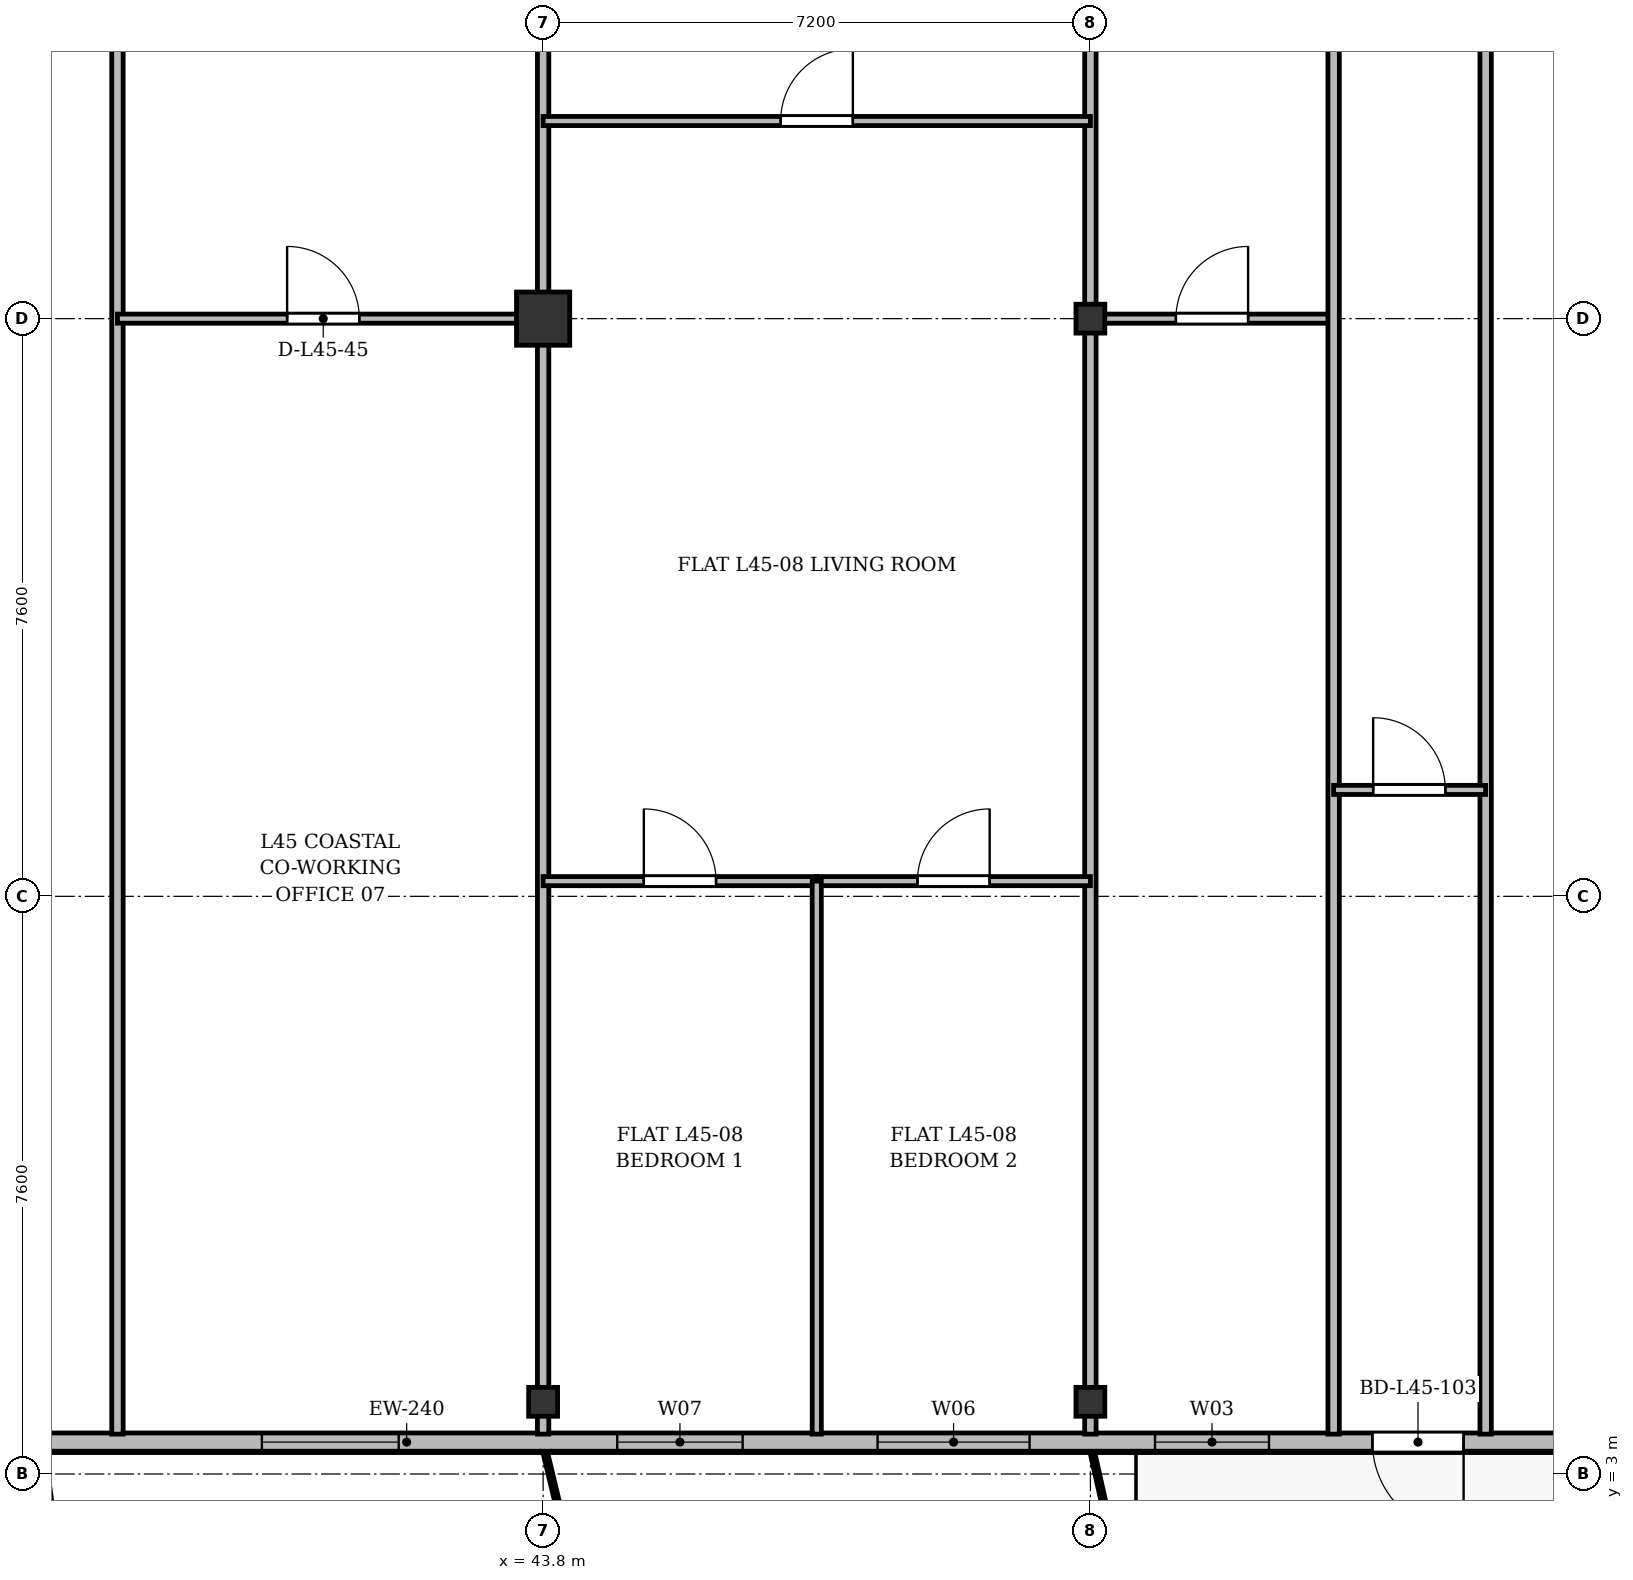
"""IFC4 building model, lengths in metres.
Left out: names, types, materials, properties, quantities, classifications, styles, units other than length and angle.
Written with IfcOpenShell. Run it as: python <this file> out.ifc"""

import sys

from ifc_helpers import new_model, si_unit, direction, frame, frame_2d, origin, origin_2d, place, context, subcontext, project, spatial, rectangle, i_section, extrude, source, transform, mapped, element, fill, save


model = new_model("IFC4")
c1 = context("Model", 3, precision=1e-05, world=origin(), true_north=direction((0.0, 1.0)))
c2 = subcontext(c1, "Body", "Model", "MODEL_VIEW")
j1 = project(units=[si_unit("LENGTHUNIT", "METRE"), si_unit("PLANEANGLEUNIT", "RADIAN")], contexts=[c1])
p1 = place(None, origin())
s1 = spatial("IfcSite", under=j1, at=p1, CompositionType="ELEMENT")
p2 = place(p1, origin())
s2 = spatial("IfcBuilding", under=s1, at=p2, CompositionType="ELEMENT")
p3 = place(p2, frame((0.0, 0.0, 171.7)))
s3 = spatial("IfcBuildingStorey", under=s2, at=p3, CompositionType="ELEMENT", Elevation=171.7)
m1 = source(origin(), c2, "Body", "SweptSolid", [
    extrude(i_section(OverallWidth=0.38, OverallDepth=0.38, WebThickness=0.02, FlangeThickness=0.03, at=origin_2d()), origin(), (0.0, 0.0, 1.0), 3.6),
])
p4 = place(p3, frame((43.8, 3.95, 0.0), z_axis=(0.0, 0.0, 1.0), x_axis=(1.0, 0.0, 0.0)))
e1 = element("IfcColumn", 1, at=p4, inside=s3, PredefinedType="COLUMN", context=c2, shape_type="MappedRepresentation", body=[
    mapped(m1, transform((0.0, 0.0, 0.0), x_axis=(1.0, 0.0, 0.0), y_axis=(0.0, 1.0, 0.0), z_axis=(0.0, 0.0, 1.0), scale=1.0)),
])
m2 = source(origin(), c2, "Body", "SweptSolid", [
    extrude(rectangle(XDim=0.7, YDim=0.7, at=origin_2d()), origin(), (0.0, 0.0, 1.0), 3.6),
])
p5 = place(p3, frame((43.8, 18.2, 0.0), z_axis=(0.0, 0.0, 1.0), x_axis=(1.0, 0.0, 0.0)))
e2 = element("IfcColumn", 2, at=p5, inside=s3, PredefinedType="COLUMN", context=c2, shape_type="MappedRepresentation", body=[
    mapped(m2, transform((0.0, 0.0, 0.0), x_axis=(1.0, 0.0, 0.0), y_axis=(0.0, 1.0, 0.0), z_axis=(0.0, 0.0, 1.0), scale=1.0)),
])
for number, where, z_axis, x_axis in (
    (3, (51.0, 3.95, 0.0), (0.0, 0.0, 1.0), (1.0, 0.0, 0.0)),
    (4, (51.0, 18.2, 0.0), (0.0, 0.0, 1.0), (1.0, 0.0, 0.0)),
):
    element("IfcColumn", number, at=place(p3, frame(where, z_axis=z_axis, x_axis=x_axis)), inside=s3, PredefinedType="COLUMN", context=c2, shape_type="MappedRepresentation", body=[
        mapped(m1, transform((0.0, 0.0, 0.0), x_axis=(1.0, 0.0, 0.0), y_axis=(0.0, 1.0, 0.0), z_axis=(0.0, 0.0, 1.0), scale=1.0)),
    ])
p6 = place(p3, frame((63.6, 3.42, 0.0), z_axis=(0.0, 0.0, 1.0), x_axis=(-1.0, 0.0, 0.0)))
e5 = element("IfcWall", 5, at=p6, inside=s3, PredefinedType="SOLIDWALL", context=c2, shape_type="SweptSolid", body=[
    extrude(rectangle(XDim=34.0, YDim=0.24, at=frame_2d((17.0, 0.0))), origin(), (0.0, 0.0, 1.0), 3.35),
])
p7 = place(p6, frame((2.845, 0.0, 0.9)))
e6 = element("IfcOpeningElement", 6, at=p7, cuts=e5, PredefinedType="OPENING", context=c2, shape_type="SweptSolid", body=[
    extrude(rectangle(XDim=1.8, YDim=1.8, at=frame_2d((0.9, 0.9))), frame((0.0, 0.13, 0.0), z_axis=(0.0, -1.0, 0.0), x_axis=(1.0, 0.0, 0.0)), (0.0, 0.0, 1.0), 0.26),
])
p8 = place(p6, frame((7.69, 0.0, 0.0)))
e7 = element("IfcOpeningElement", 7, at=p8, cuts=e5, PredefinedType="OPENING", context=c2, shape_type="SweptSolid", body=[
    extrude(rectangle(XDim=1.2, YDim=2.2, at=frame_2d((0.6, 1.1))), frame((0.0, 0.13, 0.0), z_axis=(0.0, -1.0, 0.0), x_axis=(1.0, 0.0, 0.0)), (0.0, 0.0, 1.0), 0.26),
])
p9 = place(p6, frame((10.25, 0.0, 0.9)))
e8 = element("IfcOpeningElement", 8, at=p9, cuts=e5, PredefinedType="OPENING", context=c2, shape_type="SweptSolid", body=[
    extrude(rectangle(XDim=1.5, YDim=1.75, at=frame_2d((0.75, 0.875))), frame((0.0, 0.13, 0.0), z_axis=(0.0, -1.0, 0.0), x_axis=(1.0, 0.0, 0.0)), (0.0, 0.0, 1.0), 0.26),
])
p10 = place(p6, frame((13.4, 0.0, 0.9)))
e9 = element("IfcOpeningElement", 9, at=p10, cuts=e5, PredefinedType="OPENING", context=c2, shape_type="SweptSolid", body=[
    extrude(rectangle(XDim=2.0, YDim=1.95, at=frame_2d((1.0, 0.975))), frame((0.0, 0.13, 0.0), z_axis=(0.0, -1.0, 0.0), x_axis=(1.0, 0.0, 0.0)), (0.0, 0.0, 1.0), 0.26),
])
p11 = place(p6, frame((17.175, 0.0, 0.9)))
e10 = element("IfcOpeningElement", 10, at=p11, cuts=e5, PredefinedType="OPENING", context=c2, shape_type="SweptSolid", body=[
    extrude(rectangle(XDim=1.65, YDim=1.85, at=frame_2d((0.825, 0.925))), frame((0.0, 0.13, 0.0), z_axis=(0.0, -1.0, 0.0), x_axis=(1.0, 0.0, 0.0)), (0.0, 0.0, 1.0), 0.26),
])
p12 = place(p6, frame((21.7, 0.0, 0.9)))
e11 = element("IfcOpeningElement", 11, at=p12, cuts=e5, PredefinedType="OPENING", context=c2, shape_type="SweptSolid", body=[
    extrude(rectangle(XDim=1.8, YDim=1.8, at=frame_2d((0.9, 0.9))), frame((0.0, 0.13, 0.0), z_axis=(0.0, -1.0, 0.0), x_axis=(1.0, 0.0, 0.0)), (0.0, 0.0, 1.0), 0.26),
])
p13 = place(p6, frame((28.1, 0.0, 0.9)))
e12 = element("IfcOpeningElement", 12, at=p13, cuts=e5, PredefinedType="OPENING", context=c2, shape_type="SweptSolid", body=[
    extrude(rectangle(XDim=2.2, YDim=1.8, at=frame_2d((1.1, 0.9))), frame((0.0, 0.13, 0.0), z_axis=(0.0, -1.0, 0.0), x_axis=(1.0, 0.0, 0.0)), (0.0, 0.0, 1.0), 0.26),
])
p14 = place(p3, frame((38.2, 3.525, 0.0), z_axis=(0.0, 0.0, 1.0), x_axis=(0.0, 1.0, 0.0)))
e13 = element("IfcWall", 13, at=p14, inside=s3, PredefinedType="PARTITIONING", context=c2, shape_type="SweptSolid", body=[
    extrude(rectangle(XDim=27.275, YDim=0.15, at=frame_2d((13.638, 0.0))), origin(), (0.0, 0.0, 1.0), 2.75),
])
for number, where, z_axis, x_axis in (
    (14, (43.8, 3.525, 0.0), (0.0, 0.0, 1.0), (0.0, 1.0, 0.0)),
    (15, (51.0, 3.525, 0.0), (0.0, 0.0, 1.0), (0.0, 1.0, 0.0)),
):
    element("IfcWall", number, at=place(p3, frame(where, z_axis=z_axis, x_axis=x_axis)), inside=s3, PredefinedType="PARTITIONING", context=c2, shape_type="SweptSolid", body=[
        extrude(rectangle(XDim=27.275, YDim=0.15, at=frame_2d((13.638, 0.0))), origin(), (0.0, 0.0, 1.0), 2.85),
    ])
p15 = place(p3, frame((38.2, 18.2, 0.0), z_axis=(0.0, 0.0, 1.0), x_axis=(1.0, 0.0, 0.0)))
e16 = element("IfcWall", 16, at=p15, inside=s3, PredefinedType="PARTITIONING", context=c2, shape_type="SweptSolid", body=[
    extrude(rectangle(XDim=5.6, YDim=0.12, at=frame_2d((2.8, 0.0))), origin(), (0.0, 0.0, 1.0), 2.75),
])
p16 = place(p15, frame((2.232, 0.0, 0.0)))
e17 = element("IfcOpeningElement", 17, at=p16, cuts=e16, PredefinedType="OPENING", context=c2, shape_type="SweptSolid", body=[
    extrude(rectangle(XDim=0.95, YDim=2.15, at=frame_2d((0.475, 1.075))), frame((0.0, 0.07, 0.0), z_axis=(0.0, -1.0, 0.0), x_axis=(1.0, 0.0, 0.0)), (0.0, 0.0, 1.0), 0.14),
])
p17 = place(p3, frame((43.8, 20.8, 0.0), z_axis=(0.0, 0.0, 1.0), x_axis=(1.0, 0.0, 0.0)))
e18 = element("IfcWall", 18, at=p17, inside=s3, PredefinedType="PARTITIONING", context=c2, shape_type="SweptSolid", body=[
    extrude(rectangle(XDim=7.2, YDim=0.12, at=frame_2d((3.6, 0.0))), origin(), (0.0, 0.0, 1.0), 2.85),
])
p18 = place(p17, frame((3.125, 0.0, 0.0)))
e19 = element("IfcOpeningElement", 19, at=p18, cuts=e18, PredefinedType="OPENING", context=c2, shape_type="SweptSolid", body=[
    extrude(rectangle(XDim=0.95, YDim=2.15, at=frame_2d((0.475, 1.075))), frame((0.0, 0.07, 0.0), z_axis=(0.0, -1.0, 0.0), x_axis=(1.0, 0.0, 0.0)), (0.0, 0.0, 1.0), 0.14),
])
p19 = place(p3, frame((43.8, 10.8, 0.0), z_axis=(0.0, 0.0, 1.0), x_axis=(1.0, 0.0, 0.0)))
e20 = element("IfcWall", 20, at=p19, inside=s3, PredefinedType="PARTITIONING", context=c2, shape_type="SweptSolid", body=[
    extrude(rectangle(XDim=3.6, YDim=0.12, at=frame_2d((1.8, 0.0))), origin(), (0.0, 0.0, 1.0), 2.85),
])
p20 = place(p19, frame((1.325, 0.0, 0.0)))
e21 = element("IfcOpeningElement", 21, at=p20, cuts=e20, PredefinedType="OPENING", context=c2, shape_type="SweptSolid", body=[
    extrude(rectangle(XDim=0.95, YDim=2.15, at=frame_2d((0.475, 1.075))), frame((0.0, 0.07, 0.0), z_axis=(0.0, -1.0, 0.0), x_axis=(1.0, 0.0, 0.0)), (0.0, 0.0, 1.0), 0.14),
])
p21 = place(p3, frame((47.4, 10.8, 0.0), z_axis=(0.0, 0.0, 1.0), x_axis=(1.0, 0.0, 0.0)))
e22 = element("IfcWall", 22, at=p21, inside=s3, PredefinedType="PARTITIONING", context=c2, shape_type="SweptSolid", body=[
    extrude(rectangle(XDim=3.6, YDim=0.12, at=frame_2d((1.8, 0.0))), origin(), (0.0, 0.0, 1.0), 2.85),
])
p22 = place(p21, frame((1.325, 0.0, 0.0)))
e23 = element("IfcOpeningElement", 23, at=p22, cuts=e22, PredefinedType="OPENING", context=c2, shape_type="SweptSolid", body=[
    extrude(rectangle(XDim=0.95, YDim=2.15, at=frame_2d((0.475, 1.075))), frame((0.0, 0.07, 0.0), z_axis=(0.0, -1.0, 0.0), x_axis=(1.0, 0.0, 0.0)), (0.0, 0.0, 1.0), 0.14),
])
p23 = place(p3, frame((47.4, 3.525, 0.0), z_axis=(0.0, 0.0, 1.0), x_axis=(0.0, 1.0, 0.0)))
e24 = element("IfcWall", 24, at=p23, inside=s3, PredefinedType="PARTITIONING", context=c2, shape_type="SweptSolid", body=[
    extrude(rectangle(XDim=7.275, YDim=0.12, at=frame_2d((3.638, 0.0))), origin(), (0.0, 0.0, 1.0), 2.75),
])
p24 = place(p3, frame((51.0, 18.2, 0.0), z_axis=(0.0, 0.0, 1.0), x_axis=(1.0, 0.0, 0.0)))
e25 = element("IfcWall", 25, at=p24, inside=s3, PredefinedType="PARTITIONING", context=c2, shape_type="SweptSolid", body=[
    extrude(rectangle(XDim=3.2, YDim=0.12, at=frame_2d((1.6, 0.0))), origin(), (0.0, 0.0, 1.0), 2.75),
])
p25 = place(p24, frame((1.125, 0.0, 0.0)))
e26 = element("IfcOpeningElement", 26, at=p25, cuts=e25, PredefinedType="OPENING", context=c2, shape_type="SweptSolid", body=[
    extrude(rectangle(XDim=0.95, YDim=2.15, at=frame_2d((0.475, 1.075))), frame((0.0, 0.07, 0.0), z_axis=(0.0, -1.0, 0.0), x_axis=(1.0, 0.0, 0.0)), (0.0, 0.0, 1.0), 0.14),
])
for number, where, z_axis, x_axis in (
    (27, (54.2, 3.525, 0.0), (0.0, 0.0, 1.0), (0.0, 1.0, 0.0)),
    (28, (56.2, 3.525, 0.0), (0.0, 0.0, 1.0), (0.0, 1.0, 0.0)),
):
    element("IfcWall", number, at=place(p3, frame(where, z_axis=z_axis, x_axis=x_axis)), inside=s3, PredefinedType="PARTITIONING", context=c2, shape_type="SweptSolid", body=[
        extrude(rectangle(XDim=27.275, YDim=0.15, at=frame_2d((13.638, 0.0))), origin(), (0.0, 0.0, 1.0), 2.75),
    ])
p26 = place(p3, frame((54.2, 12.0, 0.0), z_axis=(0.0, 0.0, 1.0), x_axis=(1.0, 0.0, 0.0)))
e29 = element("IfcWall", 29, at=p26, inside=s3, PredefinedType="PARTITIONING", context=c2, shape_type="SweptSolid", body=[
    extrude(rectangle(XDim=2.0, YDim=0.12, at=frame_2d((1.0, 0.0))), origin(), (0.0, 0.0, 1.0), 3.35),
])
p27 = place(p26, frame((0.52, 0.0, 0.0)))
e30 = element("IfcOpeningElement", 30, at=p27, cuts=e29, PredefinedType="OPENING", context=c2, shape_type="SweptSolid", body=[
    extrude(rectangle(XDim=0.95, YDim=2.15, at=frame_2d((0.475, 1.075))), frame((0.0, 0.07, 0.0), z_axis=(0.0, -1.0, 0.0), x_axis=(1.0, 0.0, 0.0)), (0.0, 0.0, 1.0), 0.14),
])
m3 = source(origin(), c2, "Body", "SweptSolid", [
    extrude(rectangle(XDim=1.2, YDim=2.2, at=frame_2d((0.6, 1.1))), frame((0.0, 0.025, 0.0), z_axis=(0.0, -1.0, 0.0), x_axis=(1.0, 0.0, 0.0)), (0.0, 0.0, 1.0), 0.05),
])
p28 = place(p8, origin())
e31 = element("IfcDoor", 31, at=p28, inside=s3, OperationType="SINGLE_SWING_LEFT", PredefinedType="DOOR", context=c2, shape_type="MappedRepresentation", body=[
    mapped(m3, transform((0.0, 0.0, 0.0), x_axis=(1.0, 0.0, 0.0), y_axis=(0.0, 1.0, 0.0), z_axis=(0.0, 0.0, 1.0), scale=1.0)),
])
fill(e7, e31)
m4 = source(origin(), c2, "Body", "SweptSolid", [
    extrude(rectangle(XDim=1.5, YDim=1.75, at=frame_2d((0.75, 0.875))), frame((0.0, 0.03, 0.0), z_axis=(0.0, -1.0, 0.0), x_axis=(1.0, 0.0, 0.0)), (0.0, 0.0, 1.0), 0.06),
])
p29 = place(p9, origin())
e32 = element("IfcWindow", 32, at=p29, inside=s3, PartitioningType="SINGLE_PANEL", PredefinedType="WINDOW", context=c2, shape_type="MappedRepresentation", body=[
    mapped(m4, transform((0.0, 0.0, 0.0), x_axis=(1.0, 0.0, 0.0), y_axis=(0.0, 1.0, 0.0), z_axis=(0.0, 0.0, 1.0), scale=1.0)),
])
fill(e8, e32)
m5 = source(origin(), c2, "Body", "SweptSolid", [
    extrude(rectangle(XDim=2.0, YDim=1.95, at=frame_2d((1.0, 0.975))), frame((0.0, 0.03, 0.0), z_axis=(0.0, -1.0, 0.0), x_axis=(1.0, 0.0, 0.0)), (0.0, 0.0, 1.0), 0.06),
])
p30 = place(p10, origin())
e33 = element("IfcWindow", 33, at=p30, inside=s3, PartitioningType="SINGLE_PANEL", PredefinedType="WINDOW", context=c2, shape_type="MappedRepresentation", body=[
    mapped(m5, transform((0.0, 0.0, 0.0), x_axis=(1.0, 0.0, 0.0), y_axis=(0.0, 1.0, 0.0), z_axis=(0.0, 0.0, 1.0), scale=1.0)),
])
fill(e9, e33)
m6 = source(origin(), c2, "Body", "SweptSolid", [
    extrude(rectangle(XDim=1.65, YDim=1.85, at=frame_2d((0.825, 0.925))), frame((0.0, 0.03, 0.0), z_axis=(0.0, -1.0, 0.0), x_axis=(1.0, 0.0, 0.0)), (0.0, 0.0, 1.0), 0.06),
])
p31 = place(p11, origin())
e34 = element("IfcWindow", 34, at=p31, inside=s3, PartitioningType="SINGLE_PANEL", PredefinedType="WINDOW", context=c2, shape_type="MappedRepresentation", body=[
    mapped(m6, transform((0.0, 0.0, 0.0), x_axis=(1.0, 0.0, 0.0), y_axis=(0.0, 1.0, 0.0), z_axis=(0.0, 0.0, 1.0), scale=1.0)),
])
fill(e10, e34)
m7 = source(origin(), c2, "Body", "SweptSolid", [
    extrude(rectangle(XDim=1.8, YDim=1.8, at=frame_2d((0.9, 0.9))), frame((0.0, 0.03, 0.0), z_axis=(0.0, -1.0, 0.0), x_axis=(1.0, 0.0, 0.0)), (0.0, 0.0, 1.0), 0.06),
])
p32 = place(p12, origin())
e35 = element("IfcWindow", 35, at=p32, inside=s3, PartitioningType="SINGLE_PANEL", PredefinedType="WINDOW", context=c2, shape_type="MappedRepresentation", body=[
    mapped(m7, transform((0.0, 0.0, 0.0), x_axis=(1.0, 0.0, 0.0), y_axis=(0.0, 1.0, 0.0), z_axis=(0.0, 0.0, 1.0), scale=1.0)),
])
fill(e11, e35)
m8 = source(origin(), c2, "Body", "SweptSolid", [
    extrude(rectangle(XDim=0.95, YDim=2.15, at=frame_2d((0.475, 1.075))), frame((0.0, 0.025, 0.0), z_axis=(0.0, -1.0, 0.0), x_axis=(1.0, 0.0, 0.0)), (0.0, 0.0, 1.0), 0.05),
])
p33 = place(p16, origin())
e36 = element("IfcDoor", 36, at=p33, inside=s3, OperationType="SINGLE_SWING_LEFT", PredefinedType="DOOR", context=c2, shape_type="MappedRepresentation", body=[
    mapped(m8, transform((0.0, 0.0, 0.0), x_axis=(1.0, 0.0, 0.0), y_axis=(0.0, 1.0, 0.0), z_axis=(0.0, 0.0, 1.0), scale=1.0)),
])
fill(e17, e36)
p34 = place(p18, origin())
e37 = element("IfcDoor", 37, at=p34, inside=s3, OperationType="SINGLE_SWING_RIGHT", PredefinedType="DOOR", context=c2, shape_type="MappedRepresentation", body=[
    mapped(m8, transform((0.0, 0.0, 0.0), x_axis=(1.0, 0.0, 0.0), y_axis=(0.0, 1.0, 0.0), z_axis=(0.0, 0.0, 1.0), scale=1.0)),
])
fill(e19, e37)
p35 = place(p20, origin())
e38 = element("IfcDoor", 38, at=p35, inside=s3, OperationType="SINGLE_SWING_LEFT", PredefinedType="DOOR", context=c2, shape_type="MappedRepresentation", body=[
    mapped(m8, transform((0.0, 0.0, 0.0), x_axis=(1.0, 0.0, 0.0), y_axis=(0.0, 1.0, 0.0), z_axis=(0.0, 0.0, 1.0), scale=1.0)),
])
fill(e21, e38)
p36 = place(p22, origin())
e39 = element("IfcDoor", 39, at=p36, inside=s3, OperationType="SINGLE_SWING_RIGHT", PredefinedType="DOOR", context=c2, shape_type="MappedRepresentation", body=[
    mapped(m8, transform((0.0, 0.0, 0.0), x_axis=(1.0, 0.0, 0.0), y_axis=(0.0, 1.0, 0.0), z_axis=(0.0, 0.0, 1.0), scale=1.0)),
])
fill(e23, e39)
p37 = place(p25, origin())
e40 = element("IfcDoor", 40, at=p37, inside=s3, OperationType="SINGLE_SWING_RIGHT", PredefinedType="DOOR", context=c2, shape_type="MappedRepresentation", body=[
    mapped(m8, transform((0.0, 0.0, 0.0), x_axis=(1.0, 0.0, 0.0), y_axis=(0.0, 1.0, 0.0), z_axis=(0.0, 0.0, 1.0), scale=1.0)),
])
fill(e26, e40)
p38 = place(p27, origin())
e41 = element("IfcDoor", 41, at=p38, inside=s3, OperationType="SINGLE_SWING_LEFT", PredefinedType="DOOR", context=c2, shape_type="MappedRepresentation", body=[
    mapped(m8, transform((0.0, 0.0, 0.0), x_axis=(1.0, 0.0, 0.0), y_axis=(0.0, 1.0, 0.0), z_axis=(0.0, 0.0, 1.0), scale=1.0)),
])
fill(e30, e41)
save(model, sys.argv[1])
